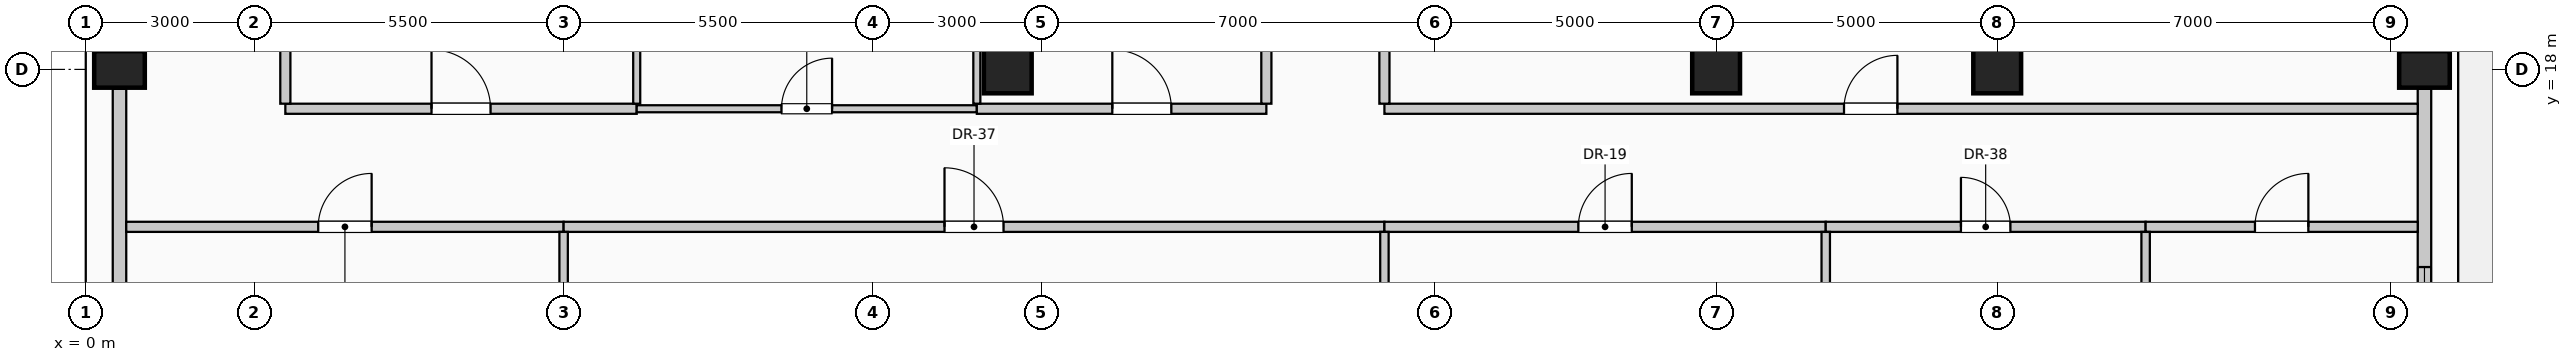
"""IFC4 building model, lengths in metres.
Left out: names, types, materials, properties, quantities, classifications, styles, units other than length and angle.
Written with IfcOpenShell. Run it as: python <this file> out.ifc"""

import sys

from ifc_helpers import new_model, si_unit, direction, frame, frame_2d, origin, origin_2d, place, context, subcontext, project, spatial, rectangle, circle, extrude, element, fill, save


model = new_model("IFC4")
c1 = context("Model", 3, precision=1e-05, world=origin(), true_north=direction((0.0, 1.0)))
c2 = subcontext(c1, "Body", "Model", "MODEL_VIEW")
j1 = project(units=[si_unit("LENGTHUNIT", "METRE"), si_unit("PLANEANGLEUNIT", "RADIAN")], contexts=[c1])
p1 = place(None, origin())
s1 = spatial("IfcSite", under=j1, at=p1, CompositionType="ELEMENT")
p2 = place(p1, origin())
s2 = spatial("IfcBuilding", under=s1, at=p2, CompositionType="ELEMENT")
p3 = place(p2, frame((0.0, 0.0, 297.0)))
s3 = spatial("IfcBuildingStorey", under=s2, at=p3, CompositionType="ELEMENT", Elevation=297.0)
for number, where, z_axis, x_axis in (
    (1, (0.6, 18.0, 0.0), (0.0, 0.0, 1.0), (0.0, 1.0, 0.0)),
    (2, (41.6, 18.0, 0.0), (0.0, 0.0, 1.0), (0.0, 1.0, 0.0)),
):
    element("IfcColumn", number, at=place(p3, frame(where, z_axis=z_axis, x_axis=x_axis)), inside=s3, PredefinedType="COLUMN", context=c2, shape_type="SweptSolid", body=[
        extrude(rectangle(XDim=0.65, YDim=0.9, at=origin_2d()), origin(), (0.0, 0.0, 1.0), 4.0),
    ])
for number, where, z_axis, x_axis in (
    (3, (16.4, 18.0, 0.0), (0.0, 0.0, 1.0), (1.0, 0.0, 0.0)),
    (4, (29.0, 18.0, 0.0), (0.0, 0.0, 1.0), (1.0, 0.0, 0.0)),
    (5, (34.0, 18.0, 0.0), (0.0, 0.0, 1.0), (1.0, 0.0, 0.0)),
):
    element("IfcColumn", number, at=place(p3, frame(where, z_axis=z_axis, x_axis=x_axis)), inside=s3, PredefinedType="COLUMN", context=c2, shape_type="SweptSolid", body=[
        extrude(circle(Radius=0.425, at=origin_2d()), origin(), (0.0, 0.0, 1.0), 4.0),
    ])
p4 = place(p3, frame((0.6, 10.345, 0.0), z_axis=(0.0, 0.0, 1.0), x_axis=(0.0, 1.0, 0.0)))
e6 = element("IfcWall", 6, at=p4, inside=s3, PredefinedType="SOLIDWALL", context=c2, shape_type="SweptSolid", body=[
    extrude(rectangle(XDim=7.31, YDim=0.24, at=frame_2d((3.655, 0.0))), origin(), (0.0, 0.0, 1.0), 3.025),
])
p5 = place(p4, frame((1.037, 0.0, 0.35)))
e7 = element("IfcOpeningElement", 7, at=p5, cuts=e6, PredefinedType="OPENING", context=c2, shape_type="SweptSolid", body=[
    extrude(rectangle(XDim=2.1, YDim=2.2, at=frame_2d((1.05, 1.1))), frame((0.0, 0.13, 0.0), z_axis=(0.0, -1.0, 0.0), x_axis=(1.0, 0.0, 0.0)), (0.0, 0.0, 1.0), 0.26),
])
p6 = place(p3, frame((41.6, 17.655, 0.0), z_axis=(0.0, 0.0, 1.0), x_axis=(0.0, -1.0, 0.0)))
e8 = element("IfcWall", 8, at=p6, inside=s3, PredefinedType="SOLIDWALL", context=c2, shape_type="SweptSolid", body=[
    extrude(rectangle(XDim=13.71, YDim=0.24, at=frame_2d((6.855, 0.0))), origin(), (0.0, 0.0, 1.0), 3.025),
])
p7 = place(p6, frame((3.17, 0.0, 0.35)))
e9 = element("IfcOpeningElement", 9, at=p7, cuts=e8, PredefinedType="OPENING", context=c2, shape_type="SweptSolid", body=[
    extrude(rectangle(XDim=2.1, YDim=2.2, at=frame_2d((1.05, 1.1))), frame((0.0, 0.13, 0.0), z_axis=(0.0, -1.0, 0.0), x_axis=(1.0, 0.0, 0.0)), (0.0, 0.0, 1.0), 0.26),
])
p8 = place(p6, frame((8.44, 0.0, 0.35)))
e10 = element("IfcOpeningElement", 10, at=p8, cuts=e8, PredefinedType="OPENING", context=c2, shape_type="SweptSolid", body=[
    extrude(rectangle(XDim=2.1, YDim=2.2, at=frame_2d((1.05, 1.1))), frame((0.0, 0.13, 0.0), z_axis=(0.0, -1.0, 0.0), x_axis=(1.0, 0.0, 0.0)), (0.0, 0.0, 1.0), 0.26),
])
p9 = place(p3, frame((0.72, 15.2, 0.0), z_axis=(0.0, 0.0, 1.0), x_axis=(1.0, 0.0, 0.0)))
e11 = element("IfcWall", 11, at=p9, inside=s3, PredefinedType="PARTITIONING", context=c2, shape_type="SweptSolid", body=[
    extrude(rectangle(XDim=7.78, YDim=0.18, at=frame_2d((3.89, 0.0))), origin(), (0.0, 0.0, 1.0), 3.775),
])
p10 = place(p9, frame((3.415, 0.0, 0.0)))
e12 = element("IfcOpeningElement", 12, at=p10, cuts=e11, PredefinedType="OPENING", context=c2, shape_type="SweptSolid", body=[
    extrude(rectangle(XDim=0.95, YDim=2.15, at=frame_2d((0.475, 1.075))), frame((0.0, 0.1, 0.0), z_axis=(0.0, -1.0, 0.0), x_axis=(1.0, 0.0, 0.0)), (0.0, 0.0, 1.0), 0.2),
])
p11 = place(p3, frame((8.5, 15.2, 0.0), z_axis=(0.0, 0.0, 1.0), x_axis=(1.0, 0.0, 0.0)))
e13 = element("IfcWall", 13, at=p11, inside=s3, PredefinedType="PARTITIONING", context=c2, shape_type="SweptSolid", body=[
    extrude(rectangle(XDim=14.6, YDim=0.18, at=frame_2d((7.3, 0.0))), origin(), (0.0, 0.0, 1.0), 3.775),
])
p12 = place(p11, frame((6.775, 0.0, 0.0)))
e14 = element("IfcOpeningElement", 14, at=p12, cuts=e13, PredefinedType="OPENING", context=c2, shape_type="SweptSolid", body=[
    extrude(rectangle(XDim=1.05, YDim=2.15, at=frame_2d((0.525, 1.075))), frame((0.0, 0.1, 0.0), z_axis=(0.0, -1.0, 0.0), x_axis=(1.0, 0.0, 0.0)), (0.0, 0.0, 1.0), 0.2),
])
p13 = place(p3, frame((23.1, 15.2, 0.0), z_axis=(0.0, 0.0, 1.0), x_axis=(1.0, 0.0, 0.0)))
e15 = element("IfcWall", 15, at=p13, inside=s3, PredefinedType="PARTITIONING", context=c2, shape_type="SweptSolid", body=[
    extrude(rectangle(XDim=7.85, YDim=0.18, at=frame_2d((3.925, 0.0))), origin(), (0.0, 0.0, 1.0), 3.775),
])
p14 = place(p13, frame((3.45, 0.0, 0.0)))
e16 = element("IfcOpeningElement", 16, at=p14, cuts=e15, PredefinedType="OPENING", context=c2, shape_type="SweptSolid", body=[
    extrude(rectangle(XDim=0.95, YDim=2.15, at=frame_2d((0.475, 1.075))), frame((0.0, 0.1, 0.0), z_axis=(0.0, -1.0, 0.0), x_axis=(1.0, 0.0, 0.0)), (0.0, 0.0, 1.0), 0.2),
])
p15 = place(p3, frame((30.95, 15.2, 0.0), z_axis=(0.0, 0.0, 1.0), x_axis=(1.0, 0.0, 0.0)))
e17 = element("IfcWall", 17, at=p15, inside=s3, PredefinedType="PARTITIONING", context=c2, shape_type="SweptSolid", body=[
    extrude(rectangle(XDim=5.69, YDim=0.18, at=frame_2d((2.845, 0.0))), origin(), (0.0, 0.0, 1.0), 3.775),
])
p16 = place(p15, frame((2.405, 0.0, 0.0)))
e18 = element("IfcOpeningElement", 18, at=p16, cuts=e17, PredefinedType="OPENING", context=c2, shape_type="SweptSolid", body=[
    extrude(rectangle(XDim=0.88, YDim=2.1, at=frame_2d((0.44, 1.05))), frame((0.0, 0.1, 0.0), z_axis=(0.0, -1.0, 0.0), x_axis=(1.0, 0.0, 0.0)), (0.0, 0.0, 1.0), 0.2),
])
p17 = place(p3, frame((36.64, 15.2, 0.0), z_axis=(0.0, 0.0, 1.0), x_axis=(1.0, 0.0, 0.0)))
e19 = element("IfcWall", 19, at=p17, inside=s3, PredefinedType="PARTITIONING", context=c2, shape_type="SweptSolid", body=[
    extrude(rectangle(XDim=4.84, YDim=0.18, at=frame_2d((2.42, 0.0))), origin(), (0.0, 0.0, 1.0), 3.775),
])
p18 = place(p17, frame((1.945, 0.0, 0.0)))
e20 = element("IfcOpeningElement", 20, at=p18, cuts=e19, PredefinedType="OPENING", context=c2, shape_type="SweptSolid", body=[
    extrude(rectangle(XDim=0.95, YDim=2.15, at=frame_2d((0.475, 1.075))), frame((0.0, 0.1, 0.0), z_axis=(0.0, -1.0, 0.0), x_axis=(1.0, 0.0, 0.0)), (0.0, 0.0, 1.0), 0.2),
])
p19 = place(p3, frame((3.55, 17.3, 0.0), z_axis=(0.0, 0.0, 1.0), x_axis=(1.0, 0.0, 0.0)))
e21 = element("IfcWall", 21, at=p19, inside=s3, PredefinedType="PARTITIONING", context=c2, shape_type="SweptSolid", body=[
    extrude(rectangle(XDim=6.25, YDim=0.18, at=frame_2d((3.125, 0.0))), origin(), (0.0, 0.0, 1.0), 3.775),
])
p20 = place(p19, frame((2.6, 0.0, 0.0)))
e22 = element("IfcOpeningElement", 22, at=p20, cuts=e21, PredefinedType="OPENING", context=c2, shape_type="SweptSolid", body=[
    extrude(rectangle(XDim=1.05, YDim=2.15, at=frame_2d((0.525, 1.075))), frame((0.0, 0.1, 0.0), z_axis=(0.0, -1.0, 0.0), x_axis=(1.0, 0.0, 0.0)), (0.0, 0.0, 1.0), 0.2),
])
p21 = place(p3, frame((9.8, 17.3, 0.0), z_axis=(0.0, 0.0, 1.0), x_axis=(1.0, 0.0, 0.0)))
e23 = element("IfcWall", 23, at=p21, inside=s3, PredefinedType="PARTITIONING", context=c2, shape_type="SweptSolid", body=[
    extrude(rectangle(XDim=6.05, YDim=0.125, at=frame_2d((3.025, 0.0))), origin(), (0.0, 0.0, 1.0), 3.775),
])
p22 = place(p21, frame((2.575, 0.0, 0.0)))
e24 = element("IfcOpeningElement", 24, at=p22, cuts=e23, PredefinedType="OPENING", context=c2, shape_type="SweptSolid", body=[
    extrude(rectangle(XDim=0.9, YDim=2.1, at=frame_2d((0.45, 1.05))), frame((0.0, 0.073, 0.0), z_axis=(0.0, -1.0, 0.0), x_axis=(1.0, 0.0, 0.0)), (0.0, 0.0, 1.0), 0.145),
])
p23 = place(p3, frame((15.85, 17.3, 0.0), z_axis=(0.0, 0.0, 1.0), x_axis=(1.0, 0.0, 0.0)))
e25 = element("IfcWall", 25, at=p23, inside=s3, PredefinedType="PARTITIONING", context=c2, shape_type="SweptSolid", body=[
    extrude(rectangle(XDim=5.15, YDim=0.18, at=frame_2d((2.575, 0.0))), origin(), (0.0, 0.0, 1.0), 3.775),
])
p24 = place(p23, frame((2.41, 0.0, 0.0)))
e26 = element("IfcOpeningElement", 26, at=p24, cuts=e25, PredefinedType="OPENING", context=c2, shape_type="SweptSolid", body=[
    extrude(rectangle(XDim=1.05, YDim=2.15, at=frame_2d((0.525, 1.075))), frame((0.0, 0.1, 0.0), z_axis=(0.0, -1.0, 0.0), x_axis=(1.0, 0.0, 0.0)), (0.0, 0.0, 1.0), 0.2),
])
p25 = place(p3, frame((23.1, 17.3, 0.0), z_axis=(0.0, 0.0, 1.0), x_axis=(1.0, 0.0, 0.0)))
e27 = element("IfcWall", 27, at=p25, inside=s3, PredefinedType="PARTITIONING", context=c2, shape_type="SweptSolid", body=[
    extrude(rectangle(XDim=18.38, YDim=0.18, at=frame_2d((9.19, 0.0))), origin(), (0.0, 0.0, 1.0), 3.775),
])
p26 = place(p25, frame((8.175, 0.0, 0.0)))
e28 = element("IfcOpeningElement", 28, at=p26, cuts=e27, PredefinedType="OPENING", context=c2, shape_type="SweptSolid", body=[
    extrude(rectangle(XDim=0.95, YDim=2.15, at=frame_2d((0.475, 1.075))), frame((0.0, 0.1, 0.0), z_axis=(0.0, -1.0, 0.0), x_axis=(1.0, 0.0, 0.0)), (0.0, 0.0, 1.0), 0.2),
])
p27 = place(p3, frame((3.55, 17.39, 0.0), z_axis=(0.0, 0.0, 1.0), x_axis=(0.0, 1.0, 0.0)))
e29 = element("IfcWall", 29, at=p27, inside=s3, PredefinedType="PARTITIONING", context=c2, shape_type="SweptSolid", body=[
    extrude(rectangle(XDim=7.335, YDim=0.18, at=frame_2d((3.667, 0.0))), origin(), (0.0, 0.0, 1.0), 3.775),
])
p28 = place(p3, frame((8.5, 1.05, 0.0), z_axis=(0.0, 0.0, 1.0), x_axis=(0.0, 1.0, 0.0)))
e30 = element("IfcWall", 30, at=p28, inside=s3, PredefinedType="PARTITIONING", context=c2, shape_type="SweptSolid", body=[
    extrude(rectangle(XDim=14.06, YDim=0.15, at=frame_2d((7.03, 0.0))), origin(), (0.0, 0.0, 1.0), 3.775),
])
for number, where, z_axis, x_axis in (
    (31, (9.8, 17.39, 0.0), (0.0, 0.0, 1.0), (0.0, 1.0, 0.0)),
    (32, (15.85, 17.39, 0.0), (0.0, 0.0, 1.0), (0.0, 1.0, 0.0)),
):
    element("IfcWall", number, at=place(p3, frame(where, z_axis=z_axis, x_axis=x_axis)), inside=s3, PredefinedType="PARTITIONING", context=c2, shape_type="SweptSolid", body=[
        extrude(rectangle(XDim=7.335, YDim=0.125, at=frame_2d((3.667, 0.0))), origin(), (0.0, 0.0, 1.0), 3.775),
    ])
p29 = place(p3, frame((21.0, 17.39, 0.0), z_axis=(0.0, 0.0, 1.0), x_axis=(0.0, 1.0, 0.0)))
e33 = element("IfcWall", 33, at=p29, inside=s3, PredefinedType="PARTITIONING", context=c2, shape_type="SweptSolid", body=[
    extrude(rectangle(XDim=7.335, YDim=0.18, at=frame_2d((3.667, 0.0))), origin(), (0.0, 0.0, 1.0), 3.775),
])
p30 = place(p3, frame((23.1, 0.4, 0.0), z_axis=(0.0, 0.0, 1.0), x_axis=(0.0, 1.0, 0.0)))
e34 = element("IfcWall", 34, at=p30, inside=s3, PredefinedType="PARTITIONING", context=c2, shape_type="SweptSolid", body=[
    extrude(rectangle(XDim=14.71, YDim=0.15, at=frame_2d((7.355, 0.0))), origin(), (0.0, 0.0, 1.0), 3.775),
])
p31 = place(p3, frame((23.1, 17.39, 0.0), z_axis=(0.0, 0.0, 1.0), x_axis=(0.0, 1.0, 0.0)))
e35 = element("IfcWall", 35, at=p31, inside=s3, PredefinedType="PARTITIONING", context=c2, shape_type="SweptSolid", body=[
    extrude(rectangle(XDim=6.735, YDim=0.18, at=frame_2d((3.368, 0.0))), origin(), (0.0, 0.0, 1.0), 3.775),
])
p32 = place(p3, frame((30.95, 0.4, 0.0), z_axis=(0.0, 0.0, 1.0), x_axis=(0.0, 1.0, 0.0)))
e36 = element("IfcWall", 36, at=p32, inside=s3, PredefinedType="PARTITIONING", context=c2, shape_type="SweptSolid", body=[
    extrude(rectangle(XDim=14.71, YDim=0.15, at=frame_2d((7.355, 0.0))), origin(), (0.0, 0.0, 1.0), 3.775),
])
p33 = place(p3, frame((36.64, 0.72, 0.0), z_axis=(0.0, 0.0, 1.0), x_axis=(0.0, 1.0, 0.0)))
e37 = element("IfcWall", 37, at=p33, inside=s3, PredefinedType="PARTITIONING", context=c2, shape_type="SweptSolid", body=[
    extrude(rectangle(XDim=14.39, YDim=0.15, at=frame_2d((7.195, 0.0))), origin(), (0.0, 0.0, 1.0), 3.775),
])
p34 = place(p7, origin())
e38 = element("IfcWindow", 38, at=p34, inside=s3, PartitioningType="SINGLE_PANEL", PredefinedType="WINDOW", context=c2, shape_type="SweptSolid", body=[
    extrude(rectangle(XDim=2.1, YDim=2.2, at=frame_2d((1.05, 1.1))), frame((0.0, 0.03, 0.0), z_axis=(0.0, -1.0, 0.0), x_axis=(1.0, 0.0, 0.0)), (0.0, 0.0, 1.0), 0.06),
])
fill(e9, e38)
p35 = place(p10, origin())
e39 = element("IfcDoor", 39, at=p35, inside=s3, OperationType="SINGLE_SWING_RIGHT", PredefinedType="DOOR", context=c2, shape_type="SweptSolid", body=[
    extrude(rectangle(XDim=0.95, YDim=2.15, at=frame_2d((0.475, 1.075))), frame((0.0, 0.025, 0.0), z_axis=(0.0, -1.0, 0.0), x_axis=(1.0, 0.0, 0.0)), (0.0, 0.0, 1.0), 0.05),
])
fill(e12, e39)
p36 = place(p12, origin())
e40 = element("IfcDoor", 40, at=p36, inside=s3, OperationType="SINGLE_SWING_LEFT", PredefinedType="DOOR", context=c2, shape_type="SweptSolid", body=[
    extrude(rectangle(XDim=1.05, YDim=2.15, at=frame_2d((0.525, 1.075))), frame((0.0, 0.025, 0.0), z_axis=(0.0, -1.0, 0.0), x_axis=(1.0, 0.0, 0.0)), (0.0, 0.0, 1.0), 0.05),
])
fill(e14, e40)
p37 = place(p14, origin())
e41 = element("IfcDoor", 41, at=p37, inside=s3, OperationType="SINGLE_SWING_RIGHT", PredefinedType="DOOR", context=c2, shape_type="SweptSolid", body=[
    extrude(rectangle(XDim=0.95, YDim=2.15, at=frame_2d((0.475, 1.075))), frame((0.0, 0.025, 0.0), z_axis=(0.0, -1.0, 0.0), x_axis=(1.0, 0.0, 0.0)), (0.0, 0.0, 1.0), 0.05),
])
fill(e16, e41)
p38 = place(p16, origin())
e42 = element("IfcDoor", 42, at=p38, inside=s3, OperationType="SINGLE_SWING_LEFT", PredefinedType="DOOR", context=c2, shape_type="SweptSolid", body=[
    extrude(rectangle(XDim=0.88, YDim=2.1, at=frame_2d((0.44, 1.05))), frame((0.0, 0.025, 0.0), z_axis=(0.0, -1.0, 0.0), x_axis=(1.0, 0.0, 0.0)), (0.0, 0.0, 1.0), 0.05),
])
fill(e18, e42)
p39 = place(p18, origin())
e43 = element("IfcDoor", 43, at=p39, inside=s3, OperationType="SINGLE_SWING_RIGHT", PredefinedType="DOOR", context=c2, shape_type="SweptSolid", body=[
    extrude(rectangle(XDim=0.95, YDim=2.15, at=frame_2d((0.475, 1.075))), frame((0.0, 0.025, 0.0), z_axis=(0.0, -1.0, 0.0), x_axis=(1.0, 0.0, 0.0)), (0.0, 0.0, 1.0), 0.05),
])
fill(e20, e43)
p40 = place(p20, origin())
e44 = element("IfcDoor", 44, at=p40, inside=s3, OperationType="SINGLE_SWING_LEFT", PredefinedType="DOOR", context=c2, shape_type="SweptSolid", body=[
    extrude(rectangle(XDim=1.05, YDim=2.15, at=frame_2d((0.525, 1.075))), frame((0.0, 0.025, 0.0), z_axis=(0.0, -1.0, 0.0), x_axis=(1.0, 0.0, 0.0)), (0.0, 0.0, 1.0), 0.05),
])
fill(e22, e44)
p41 = place(p22, origin())
e45 = element("IfcDoor", 45, at=p41, inside=s3, OperationType="SINGLE_SWING_RIGHT", PredefinedType="DOOR", context=c2, shape_type="SweptSolid", body=[
    extrude(rectangle(XDim=0.9, YDim=2.1, at=frame_2d((0.45, 1.05))), frame((0.0, 0.025, 0.0), z_axis=(0.0, -1.0, 0.0), x_axis=(1.0, 0.0, 0.0)), (0.0, 0.0, 1.0), 0.05),
])
fill(e24, e45)
p42 = place(p24, origin())
e46 = element("IfcDoor", 46, at=p42, inside=s3, OperationType="SINGLE_SWING_LEFT", PredefinedType="DOOR", context=c2, shape_type="SweptSolid", body=[
    extrude(rectangle(XDim=1.05, YDim=2.15, at=frame_2d((0.525, 1.075))), frame((0.0, 0.025, 0.0), z_axis=(0.0, -1.0, 0.0), x_axis=(1.0, 0.0, 0.0)), (0.0, 0.0, 1.0), 0.05),
])
fill(e26, e46)
p43 = place(p26, origin())
e47 = element("IfcDoor", 47, at=p43, inside=s3, OperationType="SINGLE_SWING_RIGHT", PredefinedType="DOOR", context=c2, shape_type="SweptSolid", body=[
    extrude(rectangle(XDim=0.95, YDim=2.15, at=frame_2d((0.475, 1.075))), frame((0.0, 0.025, 0.0), z_axis=(0.0, -1.0, 0.0), x_axis=(1.0, 0.0, 0.0)), (0.0, 0.0, 1.0), 0.05),
])
fill(e28, e47)
save(model, sys.argv[1])
